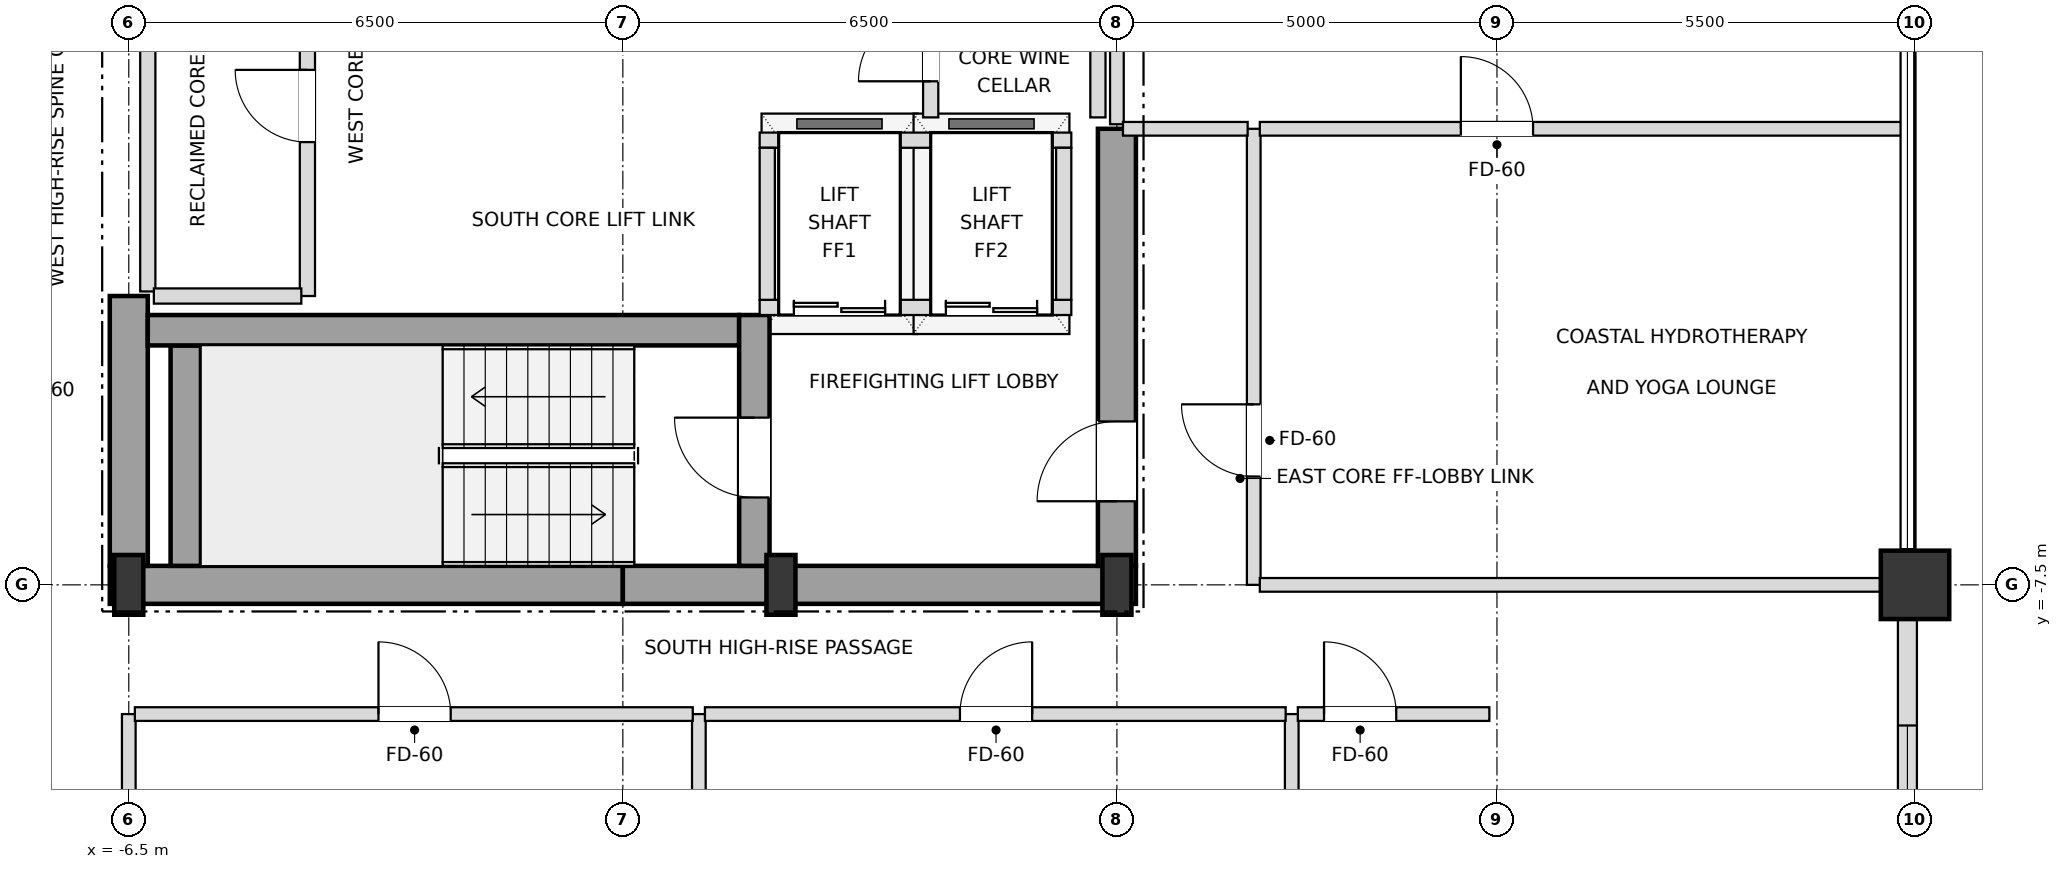
"""IFC4 building model, lengths in metres.
Left out: names, types, materials, properties, quantities, classifications, styles, units other than length and angle.
Written with IfcOpenShell. Run it as: python <this file> out.ifc"""

import sys

from ifc_helpers import new_model, si_unit, direction, frame, frame_2d, origin, origin_2d, place, context, subcontext, project, spatial, rectangle, i_section, extrude, element, fill, save


model = new_model("IFC4")
c1 = context("Model", 3, precision=1e-05, world=origin(), true_north=direction((0.0, 1.0)))
c2 = subcontext(c1, "Body", "Model", "MODEL_VIEW")
j1 = project(units=[si_unit("LENGTHUNIT", "METRE"), si_unit("PLANEANGLEUNIT", "RADIAN")], contexts=[c1])
p1 = place(None, origin())
s1 = spatial("IfcSite", under=j1, at=p1, CompositionType="ELEMENT")
p2 = place(p1, origin())
s2 = spatial("IfcBuilding", under=s1, at=p2, CompositionType="ELEMENT")
p3 = place(p2, frame((0.0, 0.0, 269.1)))
s3 = spatial("IfcBuildingStorey", under=s2, at=p3, CompositionType="ELEMENT", Elevation=269.1)
for number, where, z_axis, x_axis in (
    (1, (-6.5, -7.5, 0.0), (0.0, 0.0, 1.0), (1.0, 0.0, 0.0)),
    (2, (2.08, -7.5, 0.0), (0.0, 0.0, 1.0), (1.0, 0.0, 0.0)),
    (3, (6.5, -7.5, 0.0), (0.0, 0.0, 1.0), (1.0, 0.0, 0.0)),
):
    element("IfcColumn", number, at=place(p3, frame(where, z_axis=z_axis, x_axis=x_axis)), inside=s3, PredefinedType="COLUMN", context=c2, shape_type="SweptSolid", body=[
        extrude(i_section(OverallWidth=0.382, OverallDepth=0.786, WebThickness=0.02, FlangeThickness=0.033, at=origin_2d()), origin(), (0.0, 0.0, 1.0), 3.6),
    ])
p4 = place(p3, frame((17.0, -7.5, 0.0), z_axis=(0.0, 0.0, 1.0), x_axis=(1.0, 0.0, 0.0)))
e4 = element("IfcColumn", 4, at=p4, inside=s3, PredefinedType="USERDEFINED", context=c2, shape_type="SweptSolid", body=[
    extrude(rectangle(XDim=0.9, YDim=0.9, at=origin_2d()), origin(), (0.0, 0.0, 1.0), 3.6),
])
p5 = place(p3, frame((16.9, -12.555, 0.0), z_axis=(0.0, 0.0, 1.0), x_axis=(0.0, 1.0, 0.0)))
e5 = element("IfcWall", 5, at=p5, inside=s3, PredefinedType="SOLIDWALL", context=c2, shape_type="SweptSolid", body=[
    extrude(rectangle(XDim=4.61, YDim=0.25, at=frame_2d((2.305, 0.0))), origin(), (0.0, 0.0, 1.0), 2.748),
])
p6 = place(p5, frame((1.405, 0.0, 0.72)))
e6 = element("IfcOpeningElement", 6, at=p6, cuts=e5, PredefinedType="OPENING", context=c2, shape_type="SweptSolid", body=[
    extrude(rectangle(XDim=1.8, YDim=1.68, at=frame_2d((0.9, 0.84))), frame((0.0, 0.135, 0.0), z_axis=(0.0, -1.0, 0.0), x_axis=(1.0, 0.0, 0.0)), (0.0, 0.0, 1.0), 0.27),
])
for number, where, z_axis, x_axis in (
    (7, (-6.75, -7.5, 0.0), (0.0, 0.0, 1.0), (1.0, 0.0, 0.0)),
    (8, (0.0, -7.5, 0.0), (0.0, 0.0, 1.0), (1.0, 0.0, 0.0)),
):
    element("IfcWall", number, at=place(p3, frame(where, z_axis=z_axis, x_axis=x_axis)), inside=s3, PredefinedType="SHEAR", context=c2, shape_type="SweptSolid", body=[
        extrude(rectangle(XDim=6.75, YDim=0.5, at=frame_2d((3.375, 0.0))), origin(), (0.0, 0.0, 1.0), 3.38),
    ])
p7 = place(p3, frame((-6.5, -7.25, 0.0), z_axis=(0.0, 0.0, 1.0), x_axis=(0.0, 1.0, 0.0)))
e9 = element("IfcWall", 9, at=p7, inside=s3, PredefinedType="SHEAR", context=c2, shape_type="SweptSolid", body=[
    extrude(rectangle(XDim=3.55, YDim=0.5, at=frame_2d((1.775, 0.0))), origin(), (0.0, 0.0, 1.0), 3.38),
])
p8 = place(p3, frame((6.5, -7.25, 0.0), z_axis=(0.0, 0.0, 1.0), x_axis=(0.0, 1.0, 0.0)))
e10 = element("IfcWall", 10, at=p8, inside=s3, PredefinedType="SHEAR", context=c2, shape_type="SweptSolid", body=[
    extrude(rectangle(XDim=5.75, YDim=0.5, at=frame_2d((2.875, 0.0))), origin(), (0.0, 0.0, 1.0), 3.38),
])
p9 = place(p8, frame((0.85, 0.0, 0.0)))
e11 = element("IfcOpeningElement", 11, at=p9, cuts=e10, PredefinedType="OPENING", context=c2, shape_type="SweptSolid", body=[
    extrude(rectangle(XDim=1.05, YDim=2.15, at=frame_2d((0.525, 1.075))), frame((0.0, 0.26, 0.0), z_axis=(0.0, -1.0, 0.0), x_axis=(1.0, 0.0, 0.0)), (0.0, 0.0, 1.0), 0.52),
])
p10 = place(p3, frame((-5.75, -7.25, 0.0), z_axis=(0.0, 0.0, 1.0), x_axis=(0.0, 1.0, 0.0)))
e12 = element("IfcWall", 12, at=p10, inside=s3, PredefinedType="SHEAR", context=c2, shape_type="SweptSolid", body=[
    extrude(rectangle(XDim=2.9, YDim=0.4, at=frame_2d((1.45, 0.0))), origin(), (0.0, 0.0, 1.0), 3.38),
])
p11 = place(p3, frame((-6.25, -4.15, 0.0), z_axis=(0.0, 0.0, 1.0), x_axis=(1.0, 0.0, 0.0)))
e13 = element("IfcWall", 13, at=p11, inside=s3, PredefinedType="SHEAR", context=c2, shape_type="SweptSolid", body=[
    extrude(rectangle(XDim=7.78, YDim=0.4, at=frame_2d((3.89, 0.0))), origin(), (0.0, 0.0, 1.0), 3.38),
])
p12 = place(p3, frame((1.73, -7.25, 0.0), z_axis=(0.0, 0.0, 1.0), x_axis=(0.0, 1.0, 0.0)))
e14 = element("IfcWall", 14, at=p12, inside=s3, PredefinedType="SHEAR", context=c2, shape_type="SweptSolid", body=[
    extrude(rectangle(XDim=3.3, YDim=0.4, at=frame_2d((1.65, 0.0))), origin(), (0.0, 0.0, 1.0), 3.38),
])
p13 = place(p12, frame((0.9, 0.0, 0.0)))
e15 = element("IfcOpeningElement", 15, at=p13, cuts=e14, PredefinedType="OPENING", context=c2, shape_type="SweptSolid", body=[
    extrude(rectangle(XDim=1.05, YDim=2.15, at=frame_2d((0.525, 1.075))), frame((0.0, 0.21, 0.0), z_axis=(0.0, -1.0, 0.0), x_axis=(1.0, 0.0, 0.0)), (0.0, 0.0, 1.0), 0.42),
])
p14 = place(p3, frame((1.8, -3.85, 0.0), z_axis=(0.0, 0.0, 1.0), x_axis=(1.0, 0.0, 0.0)))
e16 = element("IfcWall", 16, at=p14, inside=s3, PredefinedType="SOLIDWALL", context=c2, shape_type="SweptSolid", body=[
    extrude(rectangle(XDim=4.1, YDim=0.2, at=frame_2d((2.05, 0.0))), origin(), (0.0, 0.0, 1.0), 3.38),
])
p15 = place(p14, frame((0.45, 0.0, 0.0)))
e17 = element("IfcOpeningElement", 17, at=p15, cuts=e16, PredefinedType="OPENING", context=c2, shape_type="SweptSolid", body=[
    extrude(rectangle(XDim=1.2, YDim=2.2, at=frame_2d((0.6, 1.1))), frame((0.0, 0.11, 0.0), z_axis=(0.0, -1.0, 0.0), x_axis=(1.0, 0.0, 0.0)), (0.0, 0.0, 1.0), 0.22),
])
p16 = place(p14, frame((2.45, 0.0, 0.0)))
e18 = element("IfcOpeningElement", 18, at=p16, cuts=e16, PredefinedType="OPENING", context=c2, shape_type="SweptSolid", body=[
    extrude(rectangle(XDim=1.2, YDim=2.2, at=frame_2d((0.6, 1.1))), frame((0.0, 0.11, 0.0), z_axis=(0.0, -1.0, 0.0), x_axis=(1.0, 0.0, 0.0)), (0.0, 0.0, 1.0), 0.22),
])
p17 = place(p3, frame((1.8, -1.65, 0.0), z_axis=(0.0, 0.0, 1.0), x_axis=(1.0, 0.0, 0.0)))
e19 = element("IfcWall", 19, at=p17, inside=s3, PredefinedType="SOLIDWALL", context=c2, shape_type="SweptSolid", body=[
    extrude(rectangle(XDim=4.1, YDim=0.2, at=frame_2d((2.05, 0.0))), origin(), (0.0, 0.0, 1.0), 3.38),
])
for number, where, z_axis, x_axis in (
    (20, (1.9, -3.75, 0.0), (0.0, 0.0, 1.0), (0.0, 1.0, 0.0)),
    (21, (5.8, -3.75, 0.0), (0.0, 0.0, 1.0), (0.0, 1.0, 0.0)),
):
    element("IfcWall", number, at=place(p3, frame(where, z_axis=z_axis, x_axis=x_axis)), inside=s3, PredefinedType="SOLIDWALL", context=c2, shape_type="SweptSolid", body=[
        extrude(rectangle(XDim=2.0, YDim=0.2, at=frame_2d((1.0, 0.0))), origin(), (0.0, 0.0, 1.0), 3.38),
    ])
p18 = place(p3, frame((-6.5, -19.9, 0.0), z_axis=(0.0, 0.0, 1.0), x_axis=(0.0, 1.0, 0.0)))
e22 = element("IfcWall", 22, at=p18, inside=s3, PredefinedType="PARTITIONING", context=c2, shape_type="SweptSolid", body=[
    extrude(rectangle(XDim=10.7, YDim=0.18, at=frame_2d((5.35, 0.0))), origin(), (0.0, 0.0, 1.0), 2.826),
])
p19 = place(p3, frame((-6.25, -3.64, 0.0), z_axis=(0.0, 0.0, 1.0), x_axis=(0.0, 1.0, 0.0)))
e23 = element("IfcWall", 23, at=p19, inside=s3, PredefinedType="SOLIDWALL", context=c2, shape_type="SweptSolid", body=[
    extrude(rectangle(XDim=7.34, YDim=0.2, at=frame_2d((3.67, 0.0))), origin(), (0.0, 0.0, 1.0), 3.38),
])
p20 = place(p3, frame((-4.15, -3.7, 0.0), z_axis=(0.0, 0.0, 1.0), x_axis=(0.0, 1.0, 0.0)))
e24 = element("IfcWall", 24, at=p20, inside=s3, PredefinedType="SOLIDWALL", context=c2, shape_type="SweptSolid", body=[
    extrude(rectangle(XDim=7.4, YDim=0.2, at=frame_2d((3.7, 0.0))), origin(), (0.0, 0.0, 1.0), 3.38),
])
p21 = place(p20, frame((2.025, 0.0, 0.0)))
e25 = element("IfcOpeningElement", 25, at=p21, cuts=e24, PredefinedType="OPENING", context=c2, shape_type="SweptSolid", body=[
    extrude(rectangle(XDim=0.95, YDim=2.15, at=frame_2d((0.475, 1.075))), frame((0.0, 0.11, 0.0), z_axis=(0.0, -1.0, 0.0), x_axis=(1.0, 0.0, 0.0)), (0.0, 0.0, 1.0), 0.22),
])
p22 = place(p3, frame((1.0, -19.9, 0.0), z_axis=(0.0, 0.0, 1.0), x_axis=(0.0, 1.0, 0.0)))
e26 = element("IfcWall", 26, at=p22, inside=s3, PredefinedType="PARTITIONING", context=c2, shape_type="SweptSolid", body=[
    extrude(rectangle(XDim=10.7, YDim=0.18, at=frame_2d((5.35, 0.0))), origin(), (0.0, 0.0, 1.0), 3.018),
])
p23 = place(p3, frame((4.05, -1.35, 0.0), z_axis=(0.0, 0.0, 1.0), x_axis=(0.0, 1.0, 0.0)))
e27 = element("IfcWall", 27, at=p23, inside=s3, PredefinedType="SOLIDWALL", context=c2, shape_type="SweptSolid", body=[
    extrude(rectangle(XDim=5.15, YDim=0.2, at=frame_2d((2.575, 0.0))), origin(), (0.0, 0.0, 1.0), 3.38),
])
p24 = place(p23, frame((0.475, 0.0, 0.0)))
e28 = element("IfcOpeningElement", 28, at=p24, cuts=e27, PredefinedType="OPENING", context=c2, shape_type="SweptSolid", body=[
    extrude(rectangle(XDim=0.95, YDim=2.15, at=frame_2d((0.475, 1.075))), frame((0.0, 0.11, 0.0), z_axis=(0.0, -1.0, 0.0), x_axis=(1.0, 0.0, 0.0)), (0.0, 0.0, 1.0), 0.22),
])
p25 = place(p23, frame((3.025, 0.0, 0.0)))
e29 = element("IfcOpeningElement", 29, at=p25, cuts=e27, PredefinedType="OPENING", context=c2, shape_type="SweptSolid", body=[
    extrude(rectangle(XDim=0.95, YDim=2.15, at=frame_2d((0.475, 1.075))), frame((0.0, 0.11, 0.0), z_axis=(0.0, -1.0, 0.0), x_axis=(1.0, 0.0, 0.0)), (0.0, 0.0, 1.0), 0.22),
])
p26 = place(p3, frame((6.25, -1.35, 0.0), z_axis=(0.0, 0.0, 1.0), x_axis=(0.0, 1.0, 0.0)))
e30 = element("IfcWall", 30, at=p26, inside=s3, PredefinedType="SOLIDWALL", context=c2, shape_type="SweptSolid", body=[
    extrude(rectangle(XDim=5.15, YDim=0.2, at=frame_2d((2.575, 0.0))), origin(), (0.0, 0.0, 1.0), 3.38),
])
p27 = place(p3, frame((6.5, -1.44, 0.0), z_axis=(0.0, 0.0, 1.0), x_axis=(0.0, 1.0, 0.0)))
e31 = element("IfcWall", 31, at=p27, inside=s3, PredefinedType="PARTITIONING", context=c2, shape_type="SweptSolid", body=[
    extrude(rectangle(XDim=5.33, YDim=0.18, at=frame_2d((2.665, 0.0))), origin(), (0.0, 0.0, 1.0), 2.826),
])
p28 = place(p3, frame((8.3, -7.5, 0.0), z_axis=(0.0, 0.0, 1.0), x_axis=(0.0, 1.0, 0.0)))
e32 = element("IfcWall", 32, at=p28, inside=s3, PredefinedType="PARTITIONING", context=c2, shape_type="SweptSolid", body=[
    extrude(rectangle(XDim=6.0, YDim=0.18, at=frame_2d((3.0, 0.0))), origin(), (0.0, 0.0, 1.0), 3.38),
])
p29 = place(p28, frame((1.425, 0.0, 0.0)))
e33 = element("IfcOpeningElement", 33, at=p29, cuts=e32, PredefinedType="OPENING", context=c2, shape_type="SweptSolid", body=[
    extrude(rectangle(XDim=0.95, YDim=2.15, at=frame_2d((0.475, 1.075))), frame((0.0, 0.1, 0.0), z_axis=(0.0, -1.0, 0.0), x_axis=(1.0, 0.0, 0.0)), (0.0, 0.0, 1.0), 0.2),
])
p30 = place(p3, frame((8.8, -19.9, 0.0), z_axis=(0.0, 0.0, 1.0), x_axis=(0.0, 1.0, 0.0)))
e34 = element("IfcWall", 34, at=p30, inside=s3, PredefinedType="PARTITIONING", context=c2, shape_type="SweptSolid", body=[
    extrude(rectangle(XDim=10.7, YDim=0.18, at=frame_2d((5.35, 0.0))), origin(), (0.0, 0.0, 1.0), 2.826),
])
p31 = place(p3, frame((-6.42, -9.2, 0.0), z_axis=(0.0, 0.0, 1.0), x_axis=(1.0, 0.0, 0.0)))
e35 = element("IfcWall", 35, at=p31, inside=s3, PredefinedType="PARTITIONING", context=c2, shape_type="SweptSolid", body=[
    extrude(rectangle(XDim=7.34, YDim=0.18, at=frame_2d((3.67, 0.0))), origin(), (0.0, 0.0, 1.0), 3.38),
])
p32 = place(p31, frame((3.205, 0.0, 0.0)))
e36 = element("IfcOpeningElement", 36, at=p32, cuts=e35, PredefinedType="OPENING", context=c2, shape_type="SweptSolid", body=[
    extrude(rectangle(XDim=0.95, YDim=2.15, at=frame_2d((0.475, 1.075))), frame((0.0, 0.1, 0.0), z_axis=(0.0, -1.0, 0.0), x_axis=(1.0, 0.0, 0.0)), (0.0, 0.0, 1.0), 0.2),
])
p33 = place(p3, frame((1.08, -9.2, 0.0), z_axis=(0.0, 0.0, 1.0), x_axis=(1.0, 0.0, 0.0)))
e37 = element("IfcWall", 37, at=p33, inside=s3, PredefinedType="PARTITIONING", context=c2, shape_type="SweptSolid", body=[
    extrude(rectangle(XDim=7.64, YDim=0.18, at=frame_2d((3.82, 0.0))), origin(), (0.0, 0.0, 1.0), 2.826),
])
p34 = place(p33, frame((3.355, 0.0, 0.0)))
e38 = element("IfcOpeningElement", 38, at=p34, cuts=e37, PredefinedType="OPENING", context=c2, shape_type="SweptSolid", body=[
    extrude(rectangle(XDim=0.95, YDim=2.15, at=frame_2d((0.475, 1.075))), frame((0.0, 0.1, 0.0), z_axis=(0.0, -1.0, 0.0), x_axis=(1.0, 0.0, 0.0)), (0.0, 0.0, 1.0), 0.2),
])
p35 = place(p3, frame((8.88, -9.2, 0.0), z_axis=(0.0, 0.0, 1.0), x_axis=(1.0, 0.0, 0.0)))
e39 = element("IfcWall", 39, at=p35, inside=s3, PredefinedType="PARTITIONING", context=c2, shape_type="SweptSolid", body=[
    extrude(rectangle(XDim=2.52, YDim=0.18, at=frame_2d((1.26, 0.0))), origin(), (0.0, 0.0, 1.0), 3.38),
])
p36 = place(p35, frame((0.345, 0.0, 0.0)))
e40 = element("IfcOpeningElement", 40, at=p36, cuts=e39, PredefinedType="OPENING", context=c2, shape_type="SweptSolid", body=[
    extrude(rectangle(XDim=0.95, YDim=2.15, at=frame_2d((0.475, 1.075))), frame((0.0, 0.1, 0.0), z_axis=(0.0, -1.0, 0.0), x_axis=(1.0, 0.0, 0.0)), (0.0, 0.0, 1.0), 0.2),
])
p37 = place(p3, frame((8.38, -7.5, 0.0), z_axis=(0.0, 0.0, 1.0), x_axis=(1.0, 0.0, 0.0)))
e41 = element("IfcWall", 41, at=p37, inside=s3, PredefinedType="PARTITIONING", context=c2, shape_type="SweptSolid", body=[
    extrude(rectangle(XDim=8.52, YDim=0.18, at=frame_2d((4.26, 0.0))), origin(), (0.0, 0.0, 1.0), 2.826),
])
p38 = place(p3, frame((-6.17, -3.7, 0.0), z_axis=(0.0, 0.0, 1.0), x_axis=(1.0, 0.0, 0.0)))
e42 = element("IfcWall", 42, at=p38, inside=s3, PredefinedType="SOLIDWALL", context=c2, shape_type="SweptSolid", body=[
    extrude(rectangle(XDim=1.94, YDim=0.2, at=frame_2d((0.97, 0.0))), origin(), (0.0, 0.0, 1.0), 3.38),
])
p39 = place(p3, frame((6.58, -1.5, 0.0), z_axis=(0.0, 0.0, 1.0), x_axis=(1.0, 0.0, 0.0)))
e43 = element("IfcWall", 43, at=p39, inside=s3, PredefinedType="PARTITIONING", context=c2, shape_type="SweptSolid", body=[
    extrude(rectangle(XDim=1.64, YDim=0.18, at=frame_2d((0.82, 0.0))), origin(), (0.0, 0.0, 1.0), 3.38),
])
p40 = place(p3, frame((8.38, -1.5, 0.0), z_axis=(0.0, 0.0, 1.0), x_axis=(1.0, 0.0, 0.0)))
e44 = element("IfcWall", 44, at=p40, inside=s3, PredefinedType="PARTITIONING", context=c2, shape_type="SweptSolid", body=[
    extrude(rectangle(XDim=8.44, YDim=0.18, at=frame_2d((4.22, 0.0))), origin(), (0.0, 0.0, 1.0), 3.018),
])
p41 = place(p40, frame((2.645, 0.0, 0.0)))
e45 = element("IfcOpeningElement", 45, at=p41, cuts=e44, PredefinedType="OPENING", context=c2, shape_type="SweptSolid", body=[
    extrude(rectangle(XDim=0.95, YDim=2.15, at=frame_2d((0.475, 1.075))), frame((0.0, 0.1, 0.0), z_axis=(0.0, -1.0, 0.0), x_axis=(1.0, 0.0, 0.0)), (0.0, 0.0, 1.0), 0.2),
])
p42 = place(p6, origin())
e46 = element("IfcWindow", 46, at=p42, inside=s3, PartitioningType="SINGLE_PANEL", PredefinedType="WINDOW", context=c2, shape_type="SweptSolid", body=[
    extrude(rectangle(XDim=1.8, YDim=1.68, at=frame_2d((0.9, 0.84))), frame((0.0, 0.03, 0.0), z_axis=(0.0, -1.0, 0.0), x_axis=(1.0, 0.0, 0.0)), (0.0, 0.0, 1.0), 0.06),
])
fill(e6, e46)
p43 = place(p9, origin())
e47 = element("IfcDoor", 47, at=p43, inside=s3, OperationType="SINGLE_SWING_LEFT", PredefinedType="DOOR", context=c2, shape_type="SweptSolid", body=[
    extrude(rectangle(XDim=1.05, YDim=2.15, at=frame_2d((0.525, 1.075))), frame((0.0, 0.025, 0.0), z_axis=(0.0, -1.0, 0.0), x_axis=(1.0, 0.0, 0.0)), (0.0, 0.0, 1.0), 0.05),
])
fill(e11, e47)
p44 = place(p13, origin())
e48 = element("IfcDoor", 48, at=p44, inside=s3, OperationType="SINGLE_SWING_RIGHT", PredefinedType="DOOR", context=c2, shape_type="SweptSolid", body=[
    extrude(rectangle(XDim=1.05, YDim=2.15, at=frame_2d((0.525, 1.075))), frame((0.0, 0.025, 0.0), z_axis=(0.0, -1.0, 0.0), x_axis=(1.0, 0.0, 0.0)), (0.0, 0.0, 1.0), 0.05),
])
fill(e15, e48)
p45 = place(p15, origin())
e49 = element("IfcDoor", 49, at=p45, inside=s3, OperationType="DOUBLE_DOOR_SLIDING", PredefinedType="DOOR", context=c2, shape_type="SweptSolid", body=[
    extrude(rectangle(XDim=1.2, YDim=2.2, at=frame_2d((0.6, 1.1))), frame((0.0, 0.025, 0.0), z_axis=(0.0, -1.0, 0.0), x_axis=(1.0, 0.0, 0.0)), (0.0, 0.0, 1.0), 0.05),
])
fill(e17, e49)
p46 = place(p16, origin())
e50 = element("IfcDoor", 50, at=p46, inside=s3, OperationType="DOUBLE_DOOR_SLIDING", PredefinedType="DOOR", context=c2, shape_type="SweptSolid", body=[
    extrude(rectangle(XDim=1.2, YDim=2.2, at=frame_2d((0.6, 1.1))), frame((0.0, 0.025, 0.0), z_axis=(0.0, -1.0, 0.0), x_axis=(1.0, 0.0, 0.0)), (0.0, 0.0, 1.0), 0.05),
])
fill(e18, e50)
p47 = place(p21, origin())
e51 = element("IfcDoor", 51, at=p47, inside=s3, OperationType="SINGLE_SWING_RIGHT", PredefinedType="DOOR", context=c2, shape_type="SweptSolid", body=[
    extrude(rectangle(XDim=0.95, YDim=2.15, at=frame_2d((0.475, 1.075))), frame((0.0, 0.025, 0.0), z_axis=(0.0, -1.0, 0.0), x_axis=(1.0, 0.0, 0.0)), (0.0, 0.0, 1.0), 0.05),
])
fill(e25, e51)
p48 = place(p24, origin())
e52 = element("IfcDoor", 52, at=p48, inside=s3, OperationType="SINGLE_SWING_LEFT", PredefinedType="DOOR", context=c2, shape_type="SweptSolid", body=[
    extrude(rectangle(XDim=0.95, YDim=2.15, at=frame_2d((0.475, 1.075))), frame((0.0, 0.025, 0.0), z_axis=(0.0, -1.0, 0.0), x_axis=(1.0, 0.0, 0.0)), (0.0, 0.0, 1.0), 0.05),
])
fill(e28, e52)
p49 = place(p32, origin())
e53 = element("IfcDoor", 53, at=p49, inside=s3, OperationType="SINGLE_SWING_LEFT", PredefinedType="DOOR", context=c2, shape_type="SweptSolid", body=[
    extrude(rectangle(XDim=0.95, YDim=2.15, at=frame_2d((0.475, 1.075))), frame((0.0, 0.025, 0.0), z_axis=(0.0, -1.0, 0.0), x_axis=(1.0, 0.0, 0.0)), (0.0, 0.0, 1.0), 0.05),
])
fill(e36, e53)
p50 = place(p34, origin())
e54 = element("IfcDoor", 54, at=p50, inside=s3, OperationType="SINGLE_SWING_RIGHT", PredefinedType="DOOR", context=c2, shape_type="SweptSolid", body=[
    extrude(rectangle(XDim=0.95, YDim=2.15, at=frame_2d((0.475, 1.075))), frame((0.0, 0.025, 0.0), z_axis=(0.0, -1.0, 0.0), x_axis=(1.0, 0.0, 0.0)), (0.0, 0.0, 1.0), 0.05),
])
fill(e38, e54)
p51 = place(p36, origin())
e55 = element("IfcDoor", 55, at=p51, inside=s3, OperationType="SINGLE_SWING_LEFT", PredefinedType="DOOR", context=c2, shape_type="SweptSolid", body=[
    extrude(rectangle(XDim=0.95, YDim=2.15, at=frame_2d((0.475, 1.075))), frame((0.0, 0.025, 0.0), z_axis=(0.0, -1.0, 0.0), x_axis=(1.0, 0.0, 0.0)), (0.0, 0.0, 1.0), 0.05),
])
fill(e40, e55)
p52 = place(p29, origin())
e56 = element("IfcDoor", 56, at=p52, inside=s3, OperationType="SINGLE_SWING_RIGHT", PredefinedType="DOOR", context=c2, shape_type="SweptSolid", body=[
    extrude(rectangle(XDim=0.95, YDim=2.15, at=frame_2d((0.475, 1.075))), frame((0.0, 0.025, 0.0), z_axis=(0.0, -1.0, 0.0), x_axis=(1.0, 0.0, 0.0)), (0.0, 0.0, 1.0), 0.05),
])
fill(e33, e56)
p53 = place(p41, origin())
e57 = element("IfcDoor", 57, at=p53, inside=s3, OperationType="SINGLE_SWING_LEFT", PredefinedType="DOOR", context=c2, shape_type="SweptSolid", body=[
    extrude(rectangle(XDim=0.95, YDim=2.15, at=frame_2d((0.475, 1.075))), frame((0.0, 0.025, 0.0), z_axis=(0.0, -1.0, 0.0), x_axis=(1.0, 0.0, 0.0)), (0.0, 0.0, 1.0), 0.05),
])
fill(e45, e57)
save(model, sys.argv[1])
